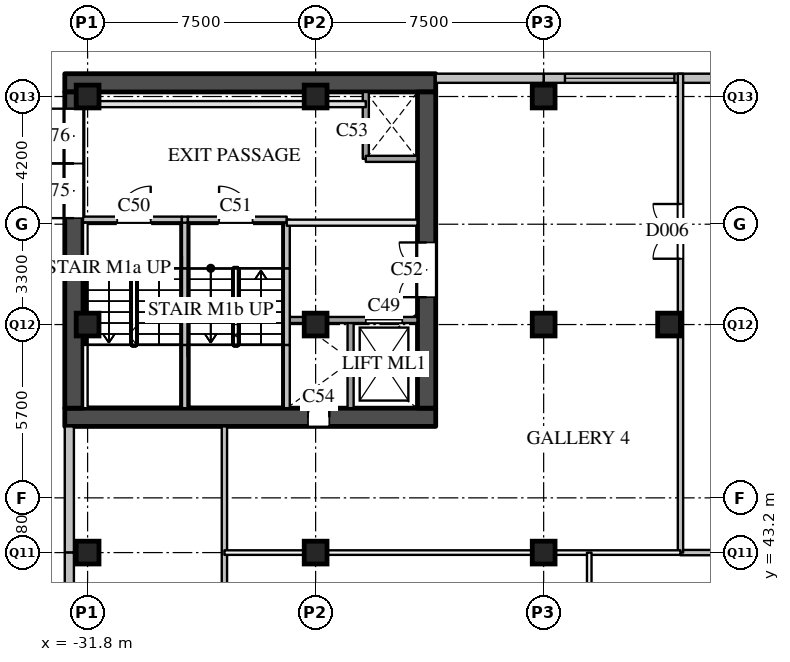
"""IFC4 building model, lengths in metres.
Left out: names, types, materials, properties, quantities, classifications, styles, units other than length and angle.
Written with IfcOpenShell. Run it as: python <this file> out.ifc"""

import sys

from ifc_helpers import new_model, si_unit, direction, frame, frame_2d, origin, origin_2d, place, context, subcontext, project, spatial, rectangle, extrude, element, fill, save


model = new_model("IFC4")
c1 = context("Model", 3, precision=1e-05, world=origin(), true_north=direction((0.0, 1.0)))
c2 = subcontext(c1, "Body", "Model", "MODEL_VIEW")
j1 = project(units=[si_unit("LENGTHUNIT", "METRE"), si_unit("PLANEANGLEUNIT", "RADIAN")], contexts=[c1])
p1 = place(None, origin())
s1 = spatial("IfcSite", under=j1, at=p1, CompositionType="ELEMENT")
p2 = place(p1, origin())
s2 = spatial("IfcBuilding", under=s1, at=p2, CompositionType="ELEMENT")
p3 = place(p2, origin())
s3 = spatial("IfcBuildingStorey", under=s2, at=p3, CompositionType="ELEMENT", Elevation=0.0)
for number, where, z_axis, x_axis in (
    (1, (-31.8, 43.2, 0.0), (0.0, 0.0, 1.0), (1.0, 0.0, 0.0)),
    (2, (-31.8, 50.7, 0.0), (0.0, 0.0, 1.0), (1.0, 0.0, 0.0)),
    (3, (-31.8, 58.2, 0.0), (0.0, 0.0, 1.0), (1.0, 0.0, 0.0)),
    (4, (-24.3, 43.2, 0.0), (0.0, 0.0, 1.0), (1.0, 0.0, 0.0)),
    (5, (-24.3, 50.7, 0.0), (0.0, 0.0, 1.0), (1.0, 0.0, 0.0)),
    (6, (-24.3, 58.2, 0.0), (0.0, 0.0, 1.0), (1.0, 0.0, 0.0)),
    (7, (-16.8, 43.2, 0.0), (0.0, 0.0, 1.0), (1.0, 0.0, 0.0)),
    (8, (-16.8, 50.7, 0.0), (0.0, 0.0, 1.0), (1.0, 0.0, 0.0)),
    (9, (-16.8, 58.2, 0.0), (0.0, 0.0, 1.0), (1.0, 0.0, 0.0)),
    (10, (-12.675, 50.7, 0.0), (0.0, 0.0, 1.0), (1.0, 0.0, 0.0)),
):
    element("IfcColumn", number, at=place(p3, frame(where, z_axis=z_axis, x_axis=x_axis)), inside=s3, PredefinedType="COLUMN", context=c2, shape_type="SweptSolid", body=[
        extrude(rectangle(XDim=0.75, YDim=0.75, at=origin_2d()), origin(), (0.0, 0.0, 1.0), 8.0),
    ])
p4 = place(p3, frame((-9.3, 58.8, 0.0), z_axis=(0.0, 0.0, 1.0), x_axis=(-1.0, 0.0, 0.0)))
e11 = element("IfcWall", 11, at=p4, inside=s3, PredefinedType="SOLIDWALL", context=c2, shape_type="SweptSolid", body=[
    extrude(rectangle(XDim=7.5, YDim=0.3, at=frame_2d((3.75, 0.0))), origin(), (0.0, 0.0, 1.0), 7.59),
])
p5 = place(p4, frame((3.2, 0.0, 0.9)))
e12 = element("IfcOpeningElement", 12, at=p5, cuts=e11, PredefinedType="OPENING", context=c2, shape_type="SweptSolid", body=[
    extrude(rectangle(XDim=3.6, YDim=3.0, at=frame_2d((1.8, 1.5))), frame((0.0, 0.16, 0.0), z_axis=(0.0, -1.0, 0.0), x_axis=(1.0, 0.0, 0.0)), (0.0, 0.0, 1.0), 0.32),
])
p6 = place(p3, frame((-16.8, 58.8, 0.0), z_axis=(0.0, 0.0, 1.0), x_axis=(-1.0, 0.0, 0.0)))
e13 = element("IfcWall", 13, at=p6, inside=s3, PredefinedType="SOLIDWALL", context=c2, shape_type="SweptSolid", body=[
    extrude(rectangle(XDim=3.55, YDim=0.3, at=frame_2d((1.775, 0.0))), origin(), (0.0, 0.0, 1.0), 7.59),
])
p7 = place(p3, frame((-32.4, 47.35, 0.0), z_axis=(0.0, 0.0, 1.0), x_axis=(0.0, -1.0, 0.0)))
e14 = element("IfcWall", 14, at=p7, inside=s3, PredefinedType="SOLIDWALL", context=c2, shape_type="SweptSolid", body=[
    extrude(rectangle(XDim=4.15, YDim=0.3, at=frame_2d((2.075, 0.0))), origin(), (0.0, 0.0, 1.0), 7.59),
])
p8 = place(p3, frame((-32.4, 43.2, 0.0), z_axis=(0.0, 0.0, 1.0), x_axis=(0.0, -1.0, 0.0)))
e15 = element("IfcWall", 15, at=p8, inside=s3, PredefinedType="SOLIDWALL", context=c2, shape_type="SweptSolid", body=[
    extrude(rectangle(XDim=7.5, YDim=0.3, at=frame_2d((3.75, 0.0))), origin(), (0.0, 0.0, 1.0), 7.59),
])
p9 = place(p8, frame((1.95, 0.0, 0.9)))
e16 = element("IfcOpeningElement", 16, at=p9, cuts=e15, PredefinedType="OPENING", context=c2, shape_type="SweptSolid", body=[
    extrude(rectangle(XDim=3.6, YDim=3.0, at=frame_2d((1.8, 1.5))), frame((0.0, 0.16, 0.0), z_axis=(0.0, -1.0, 0.0), x_axis=(1.0, 0.0, 0.0)), (0.0, 0.0, 1.0), 0.32),
])
p10 = place(p3, frame((-32.55, 47.65, 0.0), z_axis=(0.0, 0.0, 1.0), x_axis=(1.0, 0.0, 0.0)))
e17 = element("IfcWall", 17, at=p10, inside=s3, PredefinedType="SHEAR", context=c2, shape_type="SweptSolid", body=[
    extrude(rectangle(XDim=12.2, YDim=0.6, at=frame_2d((6.1, 0.0))), origin(), (0.0, 0.0, 1.0), 7.59),
])
p11 = place(p10, frame((8.0, 0.0, 0.0)))
e18 = element("IfcOpeningElement", 18, at=p11, cuts=e17, PredefinedType="OPENING", context=c2, shape_type="SweptSolid", body=[
    extrude(rectangle(XDim=0.7, YDim=2.1, at=frame_2d((0.35, 1.05))), frame((0.0, 0.31, 0.0), z_axis=(0.0, -1.0, 0.0), x_axis=(1.0, 0.0, 0.0)), (0.0, 0.0, 1.0), 0.62),
])
p12 = place(p3, frame((-32.55, 58.65, 0.0), z_axis=(0.0, 0.0, 1.0), x_axis=(1.0, 0.0, 0.0)))
e19 = element("IfcWall", 19, at=p12, inside=s3, PredefinedType="SHEAR", context=c2, shape_type="SweptSolid", body=[
    extrude(rectangle(XDim=12.2, YDim=0.6, at=frame_2d((6.1, 0.0))), origin(), (0.0, 0.0, 1.0), 7.59),
])
p13 = place(p3, frame((-32.25, 47.95, 0.0), z_axis=(0.0, 0.0, 1.0), x_axis=(0.0, 1.0, 0.0)))
e20 = element("IfcWall", 20, at=p13, inside=s3, PredefinedType="SHEAR", context=c2, shape_type="SweptSolid", body=[
    extrude(rectangle(XDim=10.4, YDim=0.6, at=frame_2d((5.2, 0.0))), origin(), (0.0, 0.0, 1.0), 7.59),
])
p14 = place(p13, frame((6.25, 0.0, 0.0)))
e21 = element("IfcOpeningElement", 21, at=p14, cuts=e20, PredefinedType="OPENING", context=c2, shape_type="SweptSolid", body=[
    extrude(rectangle(XDim=1.8, YDim=2.4, at=frame_2d((0.9, 1.2))), frame((0.0, 0.31, 0.0), z_axis=(0.0, -1.0, 0.0), x_axis=(1.0, 0.0, 0.0)), (0.0, 0.0, 1.0), 0.62),
])
p15 = place(p13, frame((8.05, 0.0, 0.0)))
e22 = element("IfcOpeningElement", 22, at=p15, cuts=e20, PredefinedType="OPENING", context=c2, shape_type="SweptSolid", body=[
    extrude(rectangle(XDim=1.8, YDim=2.4, at=frame_2d((0.9, 1.2))), frame((0.0, 0.31, 0.0), z_axis=(0.0, -1.0, 0.0), x_axis=(1.0, 0.0, 0.0)), (0.0, 0.0, 1.0), 0.62),
])
p16 = place(p3, frame((-20.65, 47.95, 0.0), z_axis=(0.0, 0.0, 1.0), x_axis=(0.0, 1.0, 0.0)))
e23 = element("IfcWall", 23, at=p16, inside=s3, PredefinedType="SHEAR", context=c2, shape_type="SweptSolid", body=[
    extrude(rectangle(XDim=10.4, YDim=0.6, at=frame_2d((5.2, 0.0))), origin(), (0.0, 0.0, 1.0), 7.59),
])
p17 = place(p16, frame((3.65, 0.0, 0.0)))
e24 = element("IfcOpeningElement", 24, at=p17, cuts=e23, PredefinedType="OPENING", context=c2, shape_type="SweptSolid", body=[
    extrude(rectangle(XDim=1.8, YDim=2.1, at=frame_2d((0.9, 1.05))), frame((0.0, 0.31, 0.0), z_axis=(0.0, -1.0, 0.0), x_axis=(1.0, 0.0, 0.0)), (0.0, 0.0, 1.0), 0.62),
])
p18 = place(p3, frame((-28.6, 47.95, 0.0), z_axis=(0.0, 0.0, 1.0), x_axis=(0.0, 1.0, 0.0)))
e25 = element("IfcWall", 25, at=p18, inside=s3, PredefinedType="SOLIDWALL", context=c2, shape_type="SweptSolid", body=[
    extrude(rectangle(XDim=2.08, YDim=0.2, at=frame_2d((1.04, 0.0))), origin(), (0.0, 0.0, 1.0), 7.59),
])
p19 = place(p3, frame((-28.6, 50.03, 0.0), z_axis=(0.0, 0.0, 1.0), x_axis=(0.0, 1.0, 0.0)))
e26 = element("IfcWall", 26, at=p19, inside=s3, PredefinedType="SOLIDWALL", context=c2, shape_type="SweptSolid", body=[
    extrude(rectangle(XDim=2.52, YDim=0.2, at=frame_2d((1.26, 0.0))), origin(), (0.0, 0.0, 1.0), 7.59),
])
p20 = place(p3, frame((-28.6, 52.55, 0.0), z_axis=(0.0, 0.0, 1.0), x_axis=(0.0, 1.0, 0.0)))
e27 = element("IfcWall", 27, at=p20, inside=s3, PredefinedType="SOLIDWALL", context=c2, shape_type="SweptSolid", body=[
    extrude(rectangle(XDim=1.6, YDim=0.2, at=frame_2d((0.8, 0.0))), origin(), (0.0, 0.0, 1.0), 7.59),
])
p21 = place(p3, frame((-25.25, 47.95, 0.0), z_axis=(0.0, 0.0, 1.0), x_axis=(0.0, 1.0, 0.0)))
e28 = element("IfcWall", 28, at=p21, inside=s3, PredefinedType="SOLIDWALL", context=c2, shape_type="SweptSolid", body=[
    extrude(rectangle(XDim=2.08, YDim=0.2, at=frame_2d((1.04, 0.0))), origin(), (0.0, 0.0, 1.0), 7.59),
])
p22 = place(p3, frame((-25.25, 50.03, 0.0), z_axis=(0.0, 0.0, 1.0), x_axis=(0.0, 1.0, 0.0)))
e29 = element("IfcWall", 29, at=p22, inside=s3, PredefinedType="SOLIDWALL", context=c2, shape_type="SweptSolid", body=[
    extrude(rectangle(XDim=2.52, YDim=0.2, at=frame_2d((1.26, 0.0))), origin(), (0.0, 0.0, 1.0), 7.59),
])
p23 = place(p3, frame((-25.25, 52.55, 0.0), z_axis=(0.0, 0.0, 1.0), x_axis=(0.0, 1.0, 0.0)))
e30 = element("IfcWall", 30, at=p23, inside=s3, PredefinedType="SOLIDWALL", context=c2, shape_type="SweptSolid", body=[
    extrude(rectangle(XDim=1.6, YDim=0.2, at=frame_2d((0.8, 0.0))), origin(), (0.0, 0.0, 1.0), 7.59),
])
p24 = place(p3, frame((-23.15, 47.95, 0.0), z_axis=(0.0, 0.0, 1.0), x_axis=(0.0, 1.0, 0.0)))
e31 = element("IfcWall", 31, at=p24, inside=s3, PredefinedType="SOLIDWALL", context=c2, shape_type="SweptSolid", body=[
    extrude(rectangle(XDim=2.9, YDim=0.2, at=frame_2d((1.45, 0.0))), origin(), (0.0, 0.0, 1.0), 7.59),
])
p25 = place(p3, frame((-22.65, 56.15, 0.0), z_axis=(0.0, 0.0, 1.0), x_axis=(0.0, 1.0, 0.0)))
e32 = element("IfcWall", 32, at=p25, inside=s3, PredefinedType="SOLIDWALL", context=c2, shape_type="SweptSolid", body=[
    extrude(rectangle(XDim=2.2, YDim=0.2, at=frame_2d((1.1, 0.0))), origin(), (0.0, 0.0, 1.0), 7.59),
])
p26 = place(p25, frame((0.55, 0.0, 0.0)))
e33 = element("IfcOpeningElement", 33, at=p26, cuts=e32, PredefinedType="OPENING", context=c2, shape_type="SweptSolid", body=[
    extrude(rectangle(XDim=0.7, YDim=2.1, at=frame_2d((0.35, 1.05))), frame((0.0, 0.11, 0.0), z_axis=(0.0, -1.0, 0.0), x_axis=(1.0, 0.0, 0.0)), (0.0, 0.0, 1.0), 0.22),
])
p27 = place(p3, frame((-25.25, 50.85, 0.0), z_axis=(0.0, 0.0, 1.0), x_axis=(1.0, 0.0, 0.0)))
e34 = element("IfcWall", 34, at=p27, inside=s3, PredefinedType="SOLIDWALL", context=c2, shape_type="SweptSolid", body=[
    extrude(rectangle(XDim=4.3, YDim=0.2, at=frame_2d((2.15, 0.0))), origin(), (0.0, 0.0, 1.0), 7.59),
])
p28 = place(p27, frame((2.6, 0.0, 0.0)))
e35 = element("IfcOpeningElement", 35, at=p28, cuts=e34, PredefinedType="OPENING", context=c2, shape_type="SweptSolid", body=[
    extrude(rectangle(XDim=1.2, YDim=2.1, at=frame_2d((0.6, 1.05))), frame((0.0, 0.11, 0.0), z_axis=(0.0, -1.0, 0.0), x_axis=(1.0, 0.0, 0.0)), (0.0, 0.0, 1.0), 0.22),
])
p29 = place(p3, frame((-25.25, 54.05, 0.0), z_axis=(0.0, 0.0, 1.0), x_axis=(1.0, 0.0, 0.0)))
e36 = element("IfcWall", 36, at=p29, inside=s3, PredefinedType="PARTITIONING", context=c2, shape_type="SweptSolid", body=[
    extrude(rectangle(XDim=4.3, YDim=0.2, at=frame_2d((2.15, 0.0))), origin(), (0.0, 0.0, 1.0), 7.59),
])
p30 = place(p3, frame((-31.95, 54.15, 0.0), z_axis=(0.0, 0.0, 1.0), x_axis=(1.0, 0.0, 0.0)))
e37 = element("IfcWall", 37, at=p30, inside=s3, PredefinedType="SOLIDWALL", context=c2, shape_type="SweptSolid", body=[
    extrude(rectangle(XDim=3.25, YDim=0.2, at=frame_2d((1.625, 0.0))), origin(), (0.0, 0.0, 1.0), 7.59),
])
p31 = place(p30, frame((1.125, 0.0, 0.0)))
e38 = element("IfcOpeningElement", 38, at=p31, cuts=e37, PredefinedType="OPENING", context=c2, shape_type="SweptSolid", body=[
    extrude(rectangle(XDim=1.1, YDim=2.1, at=frame_2d((0.55, 1.05))), frame((0.0, 0.11, 0.0), z_axis=(0.0, -1.0, 0.0), x_axis=(1.0, 0.0, 0.0)), (0.0, 0.0, 1.0), 0.22),
])
p32 = place(p3, frame((-28.7, 54.15, 0.0), z_axis=(0.0, 0.0, 1.0), x_axis=(1.0, 0.0, 0.0)))
e39 = element("IfcWall", 39, at=p32, inside=s3, PredefinedType="SOLIDWALL", context=c2, shape_type="SweptSolid", body=[
    extrude(rectangle(XDim=0.2, YDim=0.2, at=frame_2d((0.1, 0.0))), origin(), (0.0, 0.0, 1.0), 7.59),
])
p33 = place(p3, frame((-28.5, 54.15, 0.0), z_axis=(0.0, 0.0, 1.0), x_axis=(1.0, 0.0, 0.0)))
e40 = element("IfcWall", 40, at=p33, inside=s3, PredefinedType="SOLIDWALL", context=c2, shape_type="SweptSolid", body=[
    extrude(rectangle(XDim=3.25, YDim=0.2, at=frame_2d((1.625, 0.0))), origin(), (0.0, 0.0, 1.0), 7.59),
])
p34 = place(p33, frame((1.025, 0.0, 0.0)))
e41 = element("IfcOpeningElement", 41, at=p34, cuts=e40, PredefinedType="OPENING", context=c2, shape_type="SweptSolid", body=[
    extrude(rectangle(XDim=1.1, YDim=2.1, at=frame_2d((0.55, 1.05))), frame((0.0, 0.11, 0.0), z_axis=(0.0, -1.0, 0.0), x_axis=(1.0, 0.0, 0.0)), (0.0, 0.0, 1.0), 0.22),
])
p35 = place(p3, frame((-22.65, 56.15, 0.0), z_axis=(0.0, 0.0, 1.0), x_axis=(1.0, 0.0, 0.0)))
e42 = element("IfcWall", 42, at=p35, inside=s3, PredefinedType="SOLIDWALL", context=c2, shape_type="SweptSolid", body=[
    extrude(rectangle(XDim=1.7, YDim=0.2, at=frame_2d((0.85, 0.0))), origin(), (0.0, 0.0, 1.0), 7.59),
])
p36 = place(p3, frame((-31.95, 57.95, 0.0), z_axis=(0.0, 0.0, 1.0), x_axis=(1.0, 0.0, 0.0)))
e43 = element("IfcWall", 43, at=p36, inside=s3, PredefinedType="PARTITIONING", context=c2, shape_type="SweptSolid", body=[
    extrude(rectangle(XDim=9.3, YDim=0.2, at=frame_2d((4.65, 0.0))), origin(), (0.0, 0.0, 1.0), 7.59),
])
p37 = place(p3, frame((-12.3, 43.2, 0.0), z_axis=(0.0, 0.0, 1.0), x_axis=(1.0, 0.0, 0.0)))
e44 = element("IfcWall", 44, at=p37, inside=s3, PredefinedType="PARTITIONING", context=c2, shape_type="SweptSolid", body=[
    extrude(rectangle(XDim=8.25, YDim=0.175, at=frame_2d((4.125, 0.0))), origin(), (0.0, 0.0, 1.0), 6.79),
])
p38 = place(p3, frame((-27.3, 12.0, 0.0), z_axis=(0.0, 0.0, 1.0), x_axis=(0.0, 1.0, 0.0)))
e45 = element("IfcWall", 45, at=p38, inside=s3, PredefinedType="PARTITIONING", context=c2, shape_type="SweptSolid", body=[
    extrude(rectangle(XDim=35.35, YDim=0.175, at=frame_2d((17.675, 0.0))), origin(), (0.0, 0.0, 1.0), 6.79),
])
p39 = place(p38, frame((18.4, 0.0, 0.0)))
e46 = element("IfcOpeningElement", 46, at=p39, cuts=e45, PredefinedType="OPENING", context=c2, shape_type="SweptSolid", body=[
    extrude(rectangle(XDim=1.8, YDim=2.1, at=frame_2d((0.9, 1.05))), frame((0.0, 0.097, 0.0), z_axis=(0.0, -1.0, 0.0), x_axis=(1.0, 0.0, 0.0)), (0.0, 0.0, 1.0), 0.195),
])
p40 = place(p38, frame((23.7, 0.0, 0.0)))
e47 = element("IfcOpeningElement", 47, at=p40, cuts=e45, PredefinedType="OPENING", context=c2, shape_type="SweptSolid", body=[
    extrude(rectangle(XDim=1.8, YDim=2.1, at=frame_2d((0.9, 1.05))), frame((0.0, 0.097, 0.0), z_axis=(0.0, -1.0, 0.0), x_axis=(1.0, 0.0, 0.0)), (0.0, 0.0, 1.0), 0.195),
])
p41 = place(p38, frame((4.688, 0.0, 0.0)))
e48 = element("IfcOpeningElement", 48, at=p41, cuts=e45, PredefinedType="OPENING", context=c2, shape_type="SweptSolid", body=[
    extrude(rectangle(XDim=1.0, YDim=2.1, at=frame_2d((0.5, 1.05))), frame((0.0, 0.097, 0.0), z_axis=(0.0, -1.0, 0.0), x_axis=(1.0, 0.0, 0.0)), (0.0, 0.0, 1.0), 0.195),
])
p42 = place(p3, frame((-12.3, 43.2, 0.0), z_axis=(0.0, 0.0, 1.0), x_axis=(0.0, 1.0, 0.0)))
e49 = element("IfcWall", 49, at=p42, inside=s3, PredefinedType="PARTITIONING", context=c2, shape_type="SweptSolid", body=[
    extrude(rectangle(XDim=15.75, YDim=0.175, at=frame_2d((7.875, 0.0))), origin(), (0.0, 0.0, 1.0), 6.79),
])
p43 = place(p42, frame((9.665, 0.0, 0.0)))
e50 = element("IfcOpeningElement", 50, at=p43, cuts=e49, PredefinedType="OPENING", context=c2, shape_type="SweptSolid", body=[
    extrude(rectangle(XDim=1.8, YDim=2.1, at=frame_2d((0.9, 1.05))), frame((0.0, 0.097, 0.0), z_axis=(0.0, -1.0, 0.0), x_axis=(1.0, 0.0, 0.0)), (0.0, 0.0, 1.0), 0.195),
])
p44 = place(p3, frame((-27.3, 43.2, 0.0), z_axis=(0.0, 0.0, 1.0), x_axis=(1.0, 0.0, 0.0)))
e51 = element("IfcWall", 51, at=p44, inside=s3, PredefinedType="PARTITIONING", context=c2, shape_type="SweptSolid", body=[
    extrude(rectangle(XDim=15.0, YDim=0.15, at=frame_2d((7.5, 0.0))), origin(), (0.0, 0.0, 1.0), 6.79),
])
p45 = place(p3, frame((-15.3, 30.0, 0.0), z_axis=(0.0, 0.0, 1.0), x_axis=(0.0, 1.0, 0.0)))
e52 = element("IfcWall", 52, at=p45, inside=s3, PredefinedType="PARTITIONING", context=c2, shape_type="SweptSolid", body=[
    extrude(rectangle(XDim=13.2, YDim=0.15, at=frame_2d((6.6, 0.0))), origin(), (0.0, 0.0, 1.0), 6.79),
])
p46 = place(p45, frame((3.52, 0.0, 0.0)))
e53 = element("IfcOpeningElement", 53, at=p46, cuts=e52, PredefinedType="OPENING", context=c2, shape_type="SweptSolid", body=[
    extrude(rectangle(XDim=1.8, YDim=2.1, at=frame_2d((0.9, 1.05))), frame((0.0, 0.085, 0.0), z_axis=(0.0, -1.0, 0.0), x_axis=(1.0, 0.0, 0.0)), (0.0, 0.0, 1.0), 0.17),
])
p47 = place(p5, origin())
e54 = element("IfcWindow", 54, at=p47, inside=s3, PartitioningType="SINGLE_PANEL", PredefinedType="WINDOW", context=c2, shape_type="SweptSolid", body=[
    extrude(rectangle(XDim=3.6, YDim=3.0, at=frame_2d((1.8, 1.5))), frame((0.0, 0.03, 0.0), z_axis=(0.0, -1.0, 0.0), x_axis=(1.0, 0.0, 0.0)), (0.0, 0.0, 1.0), 0.06),
])
fill(e12, e54)
p48 = place(p28, origin())
e55 = element("IfcDoor", 55, at=p48, inside=s3, OperationType="SLIDING_TO_LEFT", PredefinedType="DOOR", context=c2, shape_type="SweptSolid", body=[
    extrude(rectangle(XDim=1.2, YDim=2.1, at=frame_2d((0.6, 1.05))), frame((0.0, 0.025, 0.0), z_axis=(0.0, -1.0, 0.0), x_axis=(1.0, 0.0, 0.0)), (0.0, 0.0, 1.0), 0.05),
])
fill(e35, e55)
p49 = place(p31, origin())
e56 = element("IfcDoor", 56, at=p49, inside=s3, OperationType="SINGLE_SWING_RIGHT", PredefinedType="DOOR", context=c2, shape_type="SweptSolid", body=[
    extrude(rectangle(XDim=1.1, YDim=2.1, at=frame_2d((0.55, 1.05))), frame((0.0, 0.025, 0.0), z_axis=(0.0, -1.0, 0.0), x_axis=(1.0, 0.0, 0.0)), (0.0, 0.0, 1.0), 0.05),
])
fill(e38, e56)
p50 = place(p34, origin())
e57 = element("IfcDoor", 57, at=p50, inside=s3, OperationType="SINGLE_SWING_LEFT", PredefinedType="DOOR", context=c2, shape_type="SweptSolid", body=[
    extrude(rectangle(XDim=1.1, YDim=2.1, at=frame_2d((0.55, 1.05))), frame((0.0, 0.025, 0.0), z_axis=(0.0, -1.0, 0.0), x_axis=(1.0, 0.0, 0.0)), (0.0, 0.0, 1.0), 0.05),
])
fill(e41, e57)
p51 = place(p17, origin())
e58 = element("IfcDoor", 58, at=p51, inside=s3, OperationType="DOUBLE_DOOR_SINGLE_SWING", PredefinedType="DOOR", context=c2, shape_type="SweptSolid", body=[
    extrude(rectangle(XDim=1.8, YDim=2.1, at=frame_2d((0.9, 1.05))), frame((0.0, 0.025, 0.0), z_axis=(0.0, -1.0, 0.0), x_axis=(1.0, 0.0, 0.0)), (0.0, 0.0, 1.0), 0.05),
])
fill(e24, e58)
p52 = place(p26, origin())
e59 = element("IfcDoor", 59, at=p52, inside=s3, OperationType="SINGLE_SWING_LEFT", PredefinedType="DOOR", context=c2, shape_type="SweptSolid", body=[
    extrude(rectangle(XDim=0.7, YDim=2.1, at=frame_2d((0.35, 1.05))), frame((0.0, 0.025, 0.0), z_axis=(0.0, -1.0, 0.0), x_axis=(1.0, 0.0, 0.0)), (0.0, 0.0, 1.0), 0.05),
])
fill(e33, e59)
p53 = place(p11, origin())
e60 = element("IfcDoor", 60, at=p53, inside=s3, OperationType="SINGLE_SWING_RIGHT", PredefinedType="DOOR", context=c2, shape_type="SweptSolid", body=[
    extrude(rectangle(XDim=0.7, YDim=2.1, at=frame_2d((0.35, 1.05))), frame((0.0, 0.025, 0.0), z_axis=(0.0, -1.0, 0.0), x_axis=(1.0, 0.0, 0.0)), (0.0, 0.0, 1.0), 0.05),
])
fill(e18, e60)
p54 = place(p14, origin())
e61 = element("IfcDoor", 61, at=p54, inside=s3, OperationType="DOUBLE_DOOR_SINGLE_SWING", PredefinedType="DOOR", context=c2, shape_type="SweptSolid", body=[
    extrude(rectangle(XDim=1.8, YDim=2.4, at=frame_2d((0.9, 1.2))), frame((0.0, 0.025, 0.0), z_axis=(0.0, -1.0, 0.0), x_axis=(1.0, 0.0, 0.0)), (0.0, 0.0, 1.0), 0.05),
])
fill(e21, e61)
p55 = place(p15, origin())
e62 = element("IfcDoor", 62, at=p55, inside=s3, OperationType="DOUBLE_DOOR_SINGLE_SWING", PredefinedType="DOOR", context=c2, shape_type="SweptSolid", body=[
    extrude(rectangle(XDim=1.8, YDim=2.4, at=frame_2d((0.9, 1.2))), frame((0.0, 0.025, 0.0), z_axis=(0.0, -1.0, 0.0), x_axis=(1.0, 0.0, 0.0)), (0.0, 0.0, 1.0), 0.05),
])
fill(e22, e62)
p56 = place(p43, origin())
e63 = element("IfcDoor", 63, at=p56, inside=s3, OperationType="DOUBLE_DOOR_SINGLE_SWING", PredefinedType="DOOR", context=c2, shape_type="SweptSolid", body=[
    extrude(rectangle(XDim=1.8, YDim=2.1, at=frame_2d((0.9, 1.05))), frame((0.0, 0.025, 0.0), z_axis=(0.0, -1.0, 0.0), x_axis=(1.0, 0.0, 0.0)), (0.0, 0.0, 1.0), 0.05),
])
fill(e50, e63)
save(model, sys.argv[1])
